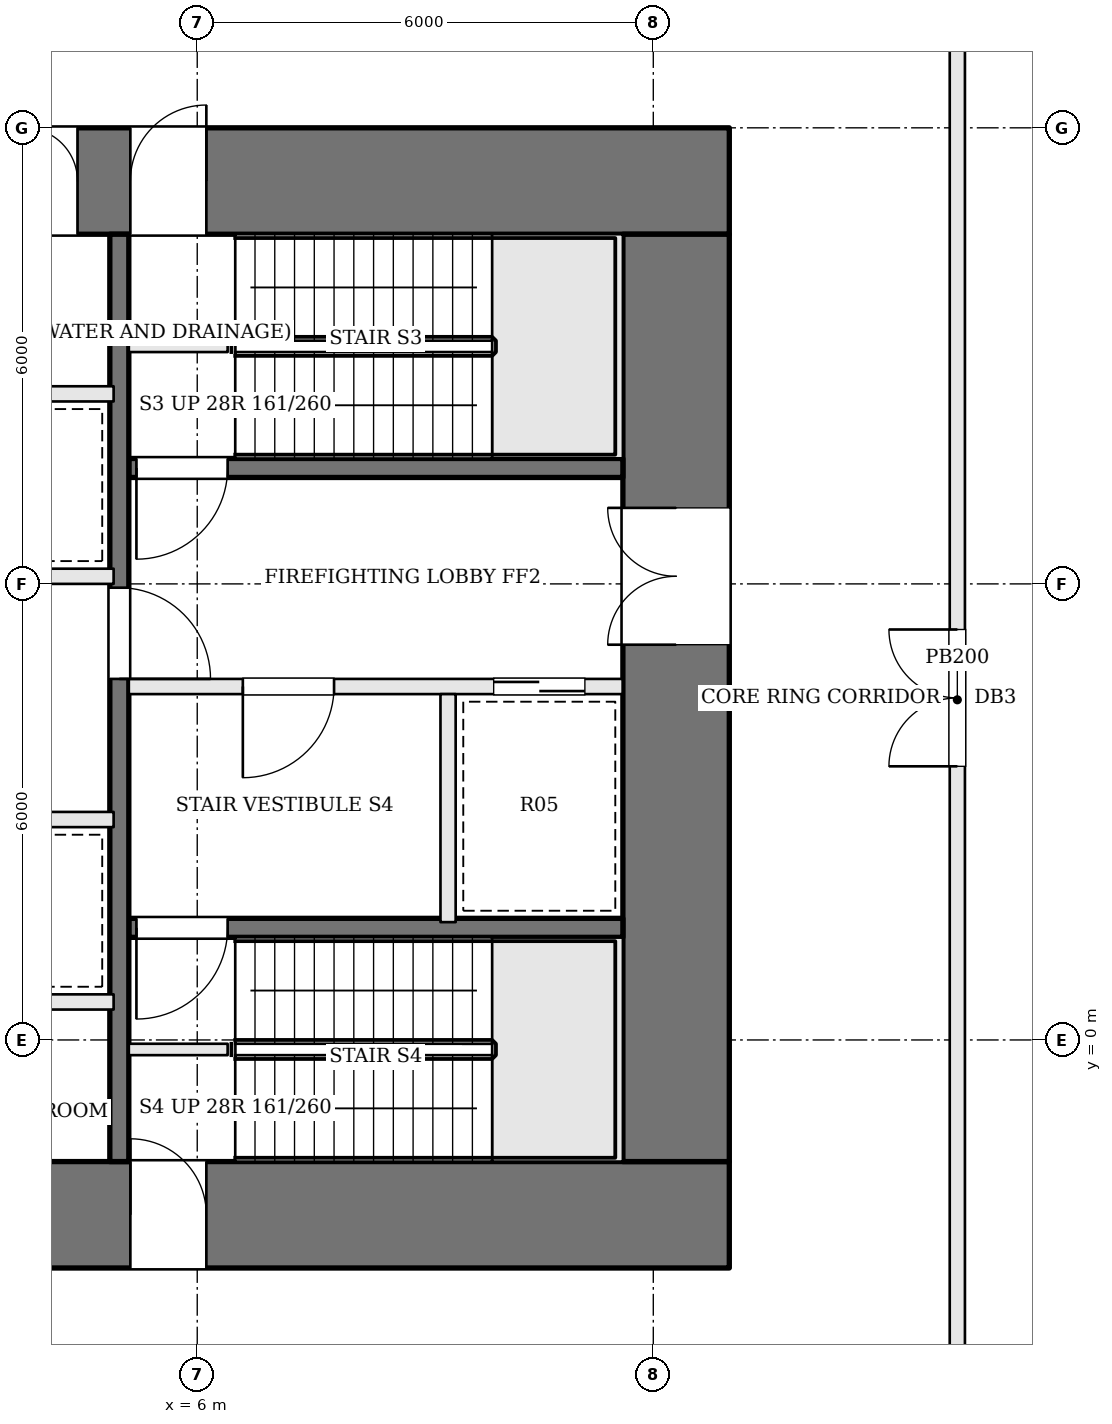
"""IFC4 building model, lengths in metres.
Left out: names, types, materials, properties, quantities, classifications, styles, units other than length and angle.
Written with IfcOpenShell. Run it as: python <this file> out.ifc"""

import sys

from ifc_helpers import new_model, si_unit, direction, frame, frame_2d, origin, place, context, subcontext, project, spatial, rectangle, extrude, element, fill, save


model = new_model("IFC4")
c1 = context("Model", 3, precision=1e-05, world=origin(), true_north=direction((0.0, 1.0)))
c2 = subcontext(c1, "Body", "Model", "MODEL_VIEW")
j1 = project(units=[si_unit("LENGTHUNIT", "METRE"), si_unit("PLANEANGLEUNIT", "RADIAN")], contexts=[c1])
p1 = place(None, origin())
s1 = spatial("IfcSite", under=j1, at=p1, CompositionType="ELEMENT")
p2 = place(p1, origin())
s2 = spatial("IfcBuilding", under=s1, at=p2, CompositionType="ELEMENT")
p3 = place(p2, frame((0.0, 0.0, 33.0)))
s3 = spatial("IfcBuildingStorey", under=s2, at=p3, CompositionType="ELEMENT", Elevation=33.0)
p4 = place(p3, frame((-13.0, 11.3, 0.0), z_axis=(0.0, 0.0, 1.0), x_axis=(1.0, 0.0, 0.0)))
e1 = element("IfcWall", 1, at=p4, inside=s3, PredefinedType="SHEAR", context=c2, shape_type="SweptSolid", body=[
    extrude(rectangle(XDim=26.0, YDim=1.4, at=frame_2d((13.0, 0.0))), origin(), (0.0, 0.0, 1.0), 4.5),
])
p5 = place(p4, frame((8.975, 0.0, 0.0)))
e2 = element("IfcOpeningElement", 2, at=p5, cuts=e1, PredefinedType="OPENING", context=c2, shape_type="SweptSolid", body=[
    extrude(rectangle(XDim=0.7, YDim=2.1, at=frame_2d((0.35, 1.05))), frame((0.0, 0.71, 0.0), z_axis=(0.0, -1.0, 0.0), x_axis=(1.0, 0.0, 0.0)), (0.0, 0.0, 1.0), 1.42),
])
p6 = place(p4, frame((11.575, 0.0, 0.0)))
e3 = element("IfcOpeningElement", 3, at=p6, cuts=e1, PredefinedType="OPENING", context=c2, shape_type="SweptSolid", body=[
    extrude(rectangle(XDim=1.2, YDim=2.1, at=frame_2d((0.6, 1.05))), frame((0.0, 0.71, 0.0), z_axis=(0.0, -1.0, 0.0), x_axis=(1.0, 0.0, 0.0)), (0.0, 0.0, 1.0), 1.42),
])
p7 = place(p4, frame((14.675, 0.0, 0.0)))
e4 = element("IfcOpeningElement", 4, at=p7, cuts=e1, PredefinedType="OPENING", context=c2, shape_type="SweptSolid", body=[
    extrude(rectangle(XDim=0.7, YDim=2.1, at=frame_2d((0.35, 1.05))), frame((0.0, 0.71, 0.0), z_axis=(0.0, -1.0, 0.0), x_axis=(1.0, 0.0, 0.0)), (0.0, 0.0, 1.0), 1.42),
])
p8 = place(p4, frame((16.725, 0.0, 0.0)))
e5 = element("IfcOpeningElement", 5, at=p8, cuts=e1, PredefinedType="OPENING", context=c2, shape_type="SweptSolid", body=[
    extrude(rectangle(XDim=0.7, YDim=2.1, at=frame_2d((0.35, 1.05))), frame((0.0, 0.71, 0.0), z_axis=(0.0, -1.0, 0.0), x_axis=(1.0, 0.0, 0.0)), (0.0, 0.0, 1.0), 1.42),
])
p9 = place(p4, frame((6.88, 0.0, 0.0)))
e6 = element("IfcOpeningElement", 6, at=p9, cuts=e1, PredefinedType="OPENING", context=c2, shape_type="SweptSolid", body=[
    extrude(rectangle(XDim=1.0, YDim=2.1, at=frame_2d((0.5, 1.05))), frame((0.0, 0.71, 0.0), z_axis=(0.0, -1.0, 0.0), x_axis=(1.0, 0.0, 0.0)), (0.0, 0.0, 1.0), 1.42),
])
p10 = place(p4, frame((18.12, 0.0, 0.0)))
e7 = element("IfcOpeningElement", 7, at=p10, cuts=e1, PredefinedType="OPENING", context=c2, shape_type="SweptSolid", body=[
    extrude(rectangle(XDim=1.0, YDim=2.1, at=frame_2d((0.5, 1.05))), frame((0.0, 0.71, 0.0), z_axis=(0.0, -1.0, 0.0), x_axis=(1.0, 0.0, 0.0)), (0.0, 0.0, 1.0), 1.42),
])
p11 = place(p3, frame((-13.0, -2.3, 0.0), z_axis=(0.0, 0.0, 1.0), x_axis=(1.0, 0.0, 0.0)))
e8 = element("IfcWall", 8, at=p11, inside=s3, PredefinedType="SHEAR", context=c2, shape_type="SweptSolid", body=[
    extrude(rectangle(XDim=26.0, YDim=1.4, at=frame_2d((13.0, 0.0))), origin(), (0.0, 0.0, 1.0), 4.5),
])
p12 = place(p11, frame((9.125, 0.0, 0.0)))
e9 = element("IfcOpeningElement", 9, at=p12, cuts=e8, PredefinedType="OPENING", context=c2, shape_type="SweptSolid", body=[
    extrude(rectangle(XDim=1.2, YDim=2.1, at=frame_2d((0.6, 1.05))), frame((0.0, 0.71, 0.0), z_axis=(0.0, -1.0, 0.0), x_axis=(1.0, 0.0, 0.0)), (0.0, 0.0, 1.0), 1.42),
])
p13 = place(p11, frame((12.375, 0.0, 0.0)))
e10 = element("IfcOpeningElement", 10, at=p13, cuts=e8, PredefinedType="OPENING", context=c2, shape_type="SweptSolid", body=[
    extrude(rectangle(XDim=1.2, YDim=2.1, at=frame_2d((0.6, 1.05))), frame((0.0, 0.71, 0.0), z_axis=(0.0, -1.0, 0.0), x_axis=(1.0, 0.0, 0.0)), (0.0, 0.0, 1.0), 1.42),
])
p14 = place(p11, frame((15.65, 0.0, 0.0)))
e11 = element("IfcOpeningElement", 11, at=p14, cuts=e8, PredefinedType="OPENING", context=c2, shape_type="SweptSolid", body=[
    extrude(rectangle(XDim=1.2, YDim=2.1, at=frame_2d((0.6, 1.05))), frame((0.0, 0.71, 0.0), z_axis=(0.0, -1.0, 0.0), x_axis=(1.0, 0.0, 0.0)), (0.0, 0.0, 1.0), 1.42),
])
p15 = place(p11, frame((6.88, 0.0, 0.0)))
e12 = element("IfcOpeningElement", 12, at=p15, cuts=e8, PredefinedType="OPENING", context=c2, shape_type="SweptSolid", body=[
    extrude(rectangle(XDim=1.0, YDim=2.1, at=frame_2d((0.5, 1.05))), frame((0.0, 0.71, 0.0), z_axis=(0.0, -1.0, 0.0), x_axis=(1.0, 0.0, 0.0)), (0.0, 0.0, 1.0), 1.42),
])
p16 = place(p11, frame((18.12, 0.0, 0.0)))
e13 = element("IfcOpeningElement", 13, at=p16, cuts=e8, PredefinedType="OPENING", context=c2, shape_type="SweptSolid", body=[
    extrude(rectangle(XDim=1.0, YDim=2.1, at=frame_2d((0.5, 1.05))), frame((0.0, 0.71, 0.0), z_axis=(0.0, -1.0, 0.0), x_axis=(1.0, 0.0, 0.0)), (0.0, 0.0, 1.0), 1.42),
])
p17 = place(p3, frame((12.3, -1.6, 0.0), z_axis=(0.0, 0.0, 1.0), x_axis=(0.0, 1.0, 0.0)))
e14 = element("IfcWall", 14, at=p17, inside=s3, PredefinedType="SHEAR", context=c2, shape_type="SweptSolid", body=[
    extrude(rectangle(XDim=12.2, YDim=1.4, at=frame_2d((6.1, 0.0))), origin(), (0.0, 0.0, 1.0), 4.5),
])
p18 = place(p17, frame((6.8, 0.0, 0.0)))
e15 = element("IfcOpeningElement", 15, at=p18, cuts=e14, PredefinedType="OPENING", context=c2, shape_type="SweptSolid", body=[
    extrude(rectangle(XDim=1.8, YDim=2.1, at=frame_2d((0.9, 1.05))), frame((0.0, 0.71, 0.0), z_axis=(0.0, -1.0, 0.0), x_axis=(1.0, 0.0, 0.0)), (0.0, 0.0, 1.0), 1.42),
])
for number, where, z_axis, x_axis in (
    (16, (6.4, 9.125, 0.0), (0.0, 0.0, 1.0), (-1.0, 0.0, 0.0)),
    (17, (6.4, -0.125, 0.0), (0.0, 0.0, 1.0), (-1.0, 0.0, 0.0)),
):
    element("IfcWall", number, at=place(p3, frame(where, z_axis=z_axis, x_axis=x_axis)), inside=s3, PredefinedType="SOLIDWALL", context=c2, shape_type="SweptSolid", body=[
        extrude(rectangle(XDim=1.3, YDim=0.15, at=frame_2d((0.65, 0.0))), origin(), (0.0, 0.0, 1.0), 4.3),
    ])
p19 = place(p3, frame((11.6, 7.525, 0.0), z_axis=(0.0, 0.0, 1.0), x_axis=(-1.0, 0.0, 0.0)))
e18 = element("IfcWall", 18, at=p19, inside=s3, PredefinedType="SOLIDWALL", context=c2, shape_type="SweptSolid", body=[
    extrude(rectangle(XDim=6.5, YDim=0.25, at=frame_2d((3.25, 0.0))), origin(), (0.0, 0.0, 1.0), 4.3),
])
p20 = place(p19, frame((5.2, 0.0, 0.0)))
e19 = element("IfcOpeningElement", 19, at=p20, cuts=e18, PredefinedType="OPENING", context=c2, shape_type="SweptSolid", body=[
    extrude(rectangle(XDim=1.2, YDim=2.1, at=frame_2d((0.6, 1.05))), frame((0.0, 0.135, 0.0), z_axis=(0.0, -1.0, 0.0), x_axis=(1.0, 0.0, 0.0)), (0.0, 0.0, 1.0), 0.27),
])
p21 = place(p3, frame((11.6, 4.65, 0.0), z_axis=(0.0, 0.0, 1.0), x_axis=(-1.0, 0.0, 0.0)))
e20 = element("IfcWall", 20, at=p21, inside=s3, PredefinedType="SOLIDWALL", context=c2, shape_type="SweptSolid", body=[
    extrude(rectangle(XDim=6.5, YDim=0.2, at=frame_2d((3.25, 0.0))), origin(), (0.0, 0.0, 1.0), 4.3),
])
p22 = place(p21, frame((3.8, 0.0, 0.0)))
e21 = element("IfcOpeningElement", 21, at=p22, cuts=e20, PredefinedType="OPENING", context=c2, shape_type="SweptSolid", body=[
    extrude(rectangle(XDim=1.2, YDim=2.1, at=frame_2d((0.6, 1.05))), frame((0.0, 0.11, 0.0), z_axis=(0.0, -1.0, 0.0), x_axis=(1.0, 0.0, 0.0)), (0.0, 0.0, 1.0), 0.22),
])
p23 = place(p21, frame((0.5, 0.0, 0.0)))
e22 = element("IfcOpeningElement", 22, at=p23, cuts=e20, PredefinedType="OPENING", context=c2, shape_type="SweptSolid", body=[
    extrude(rectangle(XDim=1.2, YDim=2.1, at=frame_2d((0.6, 1.05))), frame((0.0, 0.11, 0.0), z_axis=(0.0, -1.0, 0.0), x_axis=(1.0, 0.0, 0.0)), (0.0, 0.0, 1.0), 0.22),
])
p24 = place(p3, frame((11.6, 1.475, 0.0), z_axis=(0.0, 0.0, 1.0), x_axis=(-1.0, 0.0, 0.0)))
e23 = element("IfcWall", 23, at=p24, inside=s3, PredefinedType="SOLIDWALL", context=c2, shape_type="SweptSolid", body=[
    extrude(rectangle(XDim=6.5, YDim=0.25, at=frame_2d((3.25, 0.0))), origin(), (0.0, 0.0, 1.0), 4.3),
])
p25 = place(p24, frame((5.2, 0.0, 0.0)))
e24 = element("IfcOpeningElement", 24, at=p25, cuts=e23, PredefinedType="OPENING", context=c2, shape_type="SweptSolid", body=[
    extrude(rectangle(XDim=1.2, YDim=2.1, at=frame_2d((0.6, 1.05))), frame((0.0, 0.135, 0.0), z_axis=(0.0, -1.0, 0.0), x_axis=(1.0, 0.0, 0.0)), (0.0, 0.0, 1.0), 0.27),
])
p26 = place(p3, frame((9.3, 4.55, 0.0), z_axis=(0.0, 0.0, 1.0), x_axis=(0.0, -1.0, 0.0)))
e25 = element("IfcWall", 25, at=p26, inside=s3, PredefinedType="SOLIDWALL", context=c2, shape_type="SweptSolid", body=[
    extrude(rectangle(XDim=3.0, YDim=0.2, at=frame_2d((1.5, 0.0))), origin(), (0.0, 0.0, 1.0), 4.3),
])
p27 = place(p3, frame((4.975, 10.6, 0.0), z_axis=(0.0, 0.0, 1.0), x_axis=(0.0, -1.0, 0.0)))
e26 = element("IfcWall", 26, at=p27, inside=s3, PredefinedType="SOLIDWALL", context=c2, shape_type="SweptSolid", body=[
    extrude(rectangle(XDim=12.2, YDim=0.25, at=frame_2d((6.1, 0.0))), origin(), (0.0, 0.0, 1.0), 4.3),
])
p28 = place(p27, frame((4.65, 0.0, 0.0)))
e27 = element("IfcOpeningElement", 27, at=p28, cuts=e26, PredefinedType="OPENING", context=c2, shape_type="SweptSolid", body=[
    extrude(rectangle(XDim=1.2, YDim=2.1, at=frame_2d((0.6, 1.05))), frame((0.0, 0.135, 0.0), z_axis=(0.0, -1.0, 0.0), x_axis=(1.0, 0.0, 0.0)), (0.0, 0.0, 1.0), 0.27),
])
for number, where, z_axis, x_axis in (
    (28, (-4.9, 0.5, 0.0), (0.0, 0.0, 1.0), (1.0, 0.0, 0.0)),
    (29, (-4.9, 2.9, 0.0), (0.0, 0.0, 1.0), (1.0, 0.0, 0.0)),
    (30, (-4.9, 6.1, 0.0), (0.0, 0.0, 1.0), (1.0, 0.0, 0.0)),
    (31, (-4.9, 8.5, 0.0), (0.0, 0.0, 1.0), (1.0, 0.0, 0.0)),
):
    element("IfcWall", number, at=place(p3, frame(where, z_axis=z_axis, x_axis=x_axis)), inside=s3, PredefinedType="SOLIDWALL", context=c2, shape_type="SweptSolid", body=[
        extrude(rectangle(XDim=9.8, YDim=0.2, at=frame_2d((4.9, 0.0))), origin(), (0.0, 0.0, 1.0), 4.3),
    ])
p29 = place(p3, frame((16.0, -5.9, 0.0), z_axis=(0.0, 0.0, 1.0), x_axis=(0.0, 1.0, 0.0)))
e32 = element("IfcWall", 32, at=p29, inside=s3, PredefinedType="PARTITIONING", context=c2, shape_type="SweptSolid", body=[
    extrude(rectangle(XDim=20.75, YDim=0.2, at=frame_2d((10.375, 0.0))), origin(), (0.0, 0.0, 1.0), 4.3),
])
p30 = place(p29, frame((9.5, 0.0, 0.0)))
e33 = element("IfcOpeningElement", 33, at=p30, cuts=e32, PredefinedType="OPENING", context=c2, shape_type="SweptSolid", body=[
    extrude(rectangle(XDim=1.8, YDim=2.1, at=frame_2d((0.9, 1.05))), frame((0.0, 0.11, 0.0), z_axis=(0.0, -1.0, 0.0), x_axis=(1.0, 0.0, 0.0)), (0.0, 0.0, 1.0), 0.22),
])
p31 = place(p3, frame((14.392, 16.035, 0.0), z_axis=(0.0, 0.0, 1.0), x_axis=(0.863774384703, -0.503878767493, 0.0)))
e34 = element("IfcWall", 34, at=p31, inside=s3, PredefinedType="SOLIDWALL", context=c2, shape_type="SweptSolid", body=[
    extrude(rectangle(XDim=5.882, YDim=0.3, at=frame_2d((2.941, 0.0))), origin(), (0.0, 0.0, 1.0), 4.3),
])
p32 = place(p18, origin())
e35 = element("IfcDoor", 35, at=p32, inside=s3, OperationType="DOUBLE_DOOR_SINGLE_SWING", PredefinedType="DOOR", context=c2, shape_type="SweptSolid", body=[
    extrude(rectangle(XDim=1.8, YDim=2.1, at=frame_2d((0.9, 1.05))), frame((0.0, 0.025, 0.0), z_axis=(0.0, -1.0, 0.0), x_axis=(1.0, 0.0, 0.0)), (0.0, 0.0, 1.0), 0.05),
])
fill(e15, e35)
p33 = place(p28, origin())
e36 = element("IfcDoor", 36, at=p33, inside=s3, OperationType="SINGLE_SWING_RIGHT", PredefinedType="DOOR", context=c2, shape_type="SweptSolid", body=[
    extrude(rectangle(XDim=1.2, YDim=2.1, at=frame_2d((0.6, 1.05))), frame((0.0, 0.025, 0.0), z_axis=(0.0, -1.0, 0.0), x_axis=(1.0, 0.0, 0.0)), (0.0, 0.0, 1.0), 0.05),
])
fill(e27, e36)
p34 = place(p22, origin())
e37 = element("IfcDoor", 37, at=p34, inside=s3, OperationType="SINGLE_SWING_RIGHT", PredefinedType="DOOR", context=c2, shape_type="SweptSolid", body=[
    extrude(rectangle(XDim=1.2, YDim=2.1, at=frame_2d((0.6, 1.05))), frame((0.0, 0.025, 0.0), z_axis=(0.0, -1.0, 0.0), x_axis=(1.0, 0.0, 0.0)), (0.0, 0.0, 1.0), 0.05),
])
fill(e21, e37)
p35 = place(p20, origin())
e38 = element("IfcDoor", 38, at=p35, inside=s3, OperationType="SINGLE_SWING_RIGHT", PredefinedType="DOOR", context=c2, shape_type="SweptSolid", body=[
    extrude(rectangle(XDim=1.2, YDim=2.1, at=frame_2d((0.6, 1.05))), frame((0.0, 0.025, 0.0), z_axis=(0.0, -1.0, 0.0), x_axis=(1.0, 0.0, 0.0)), (0.0, 0.0, 1.0), 0.05),
])
fill(e19, e38)
p36 = place(p25, origin())
e39 = element("IfcDoor", 39, at=p36, inside=s3, OperationType="SINGLE_SWING_RIGHT", PredefinedType="DOOR", context=c2, shape_type="SweptSolid", body=[
    extrude(rectangle(XDim=1.2, YDim=2.1, at=frame_2d((0.6, 1.05))), frame((0.0, 0.025, 0.0), z_axis=(0.0, -1.0, 0.0), x_axis=(1.0, 0.0, 0.0)), (0.0, 0.0, 1.0), 0.05),
])
fill(e24, e39)
p37 = place(p23, origin())
e40 = element("IfcDoor", 40, at=p37, inside=s3, OperationType="SLIDING_TO_RIGHT", PredefinedType="DOOR", context=c2, shape_type="SweptSolid", body=[
    extrude(rectangle(XDim=1.2, YDim=2.1, at=frame_2d((0.6, 1.05))), frame((0.0, 0.025, 0.0), z_axis=(0.0, -1.0, 0.0), x_axis=(1.0, 0.0, 0.0)), (0.0, 0.0, 1.0), 0.05),
])
fill(e22, e40)
p38 = place(p8, origin())
e41 = element("IfcDoor", 41, at=p38, inside=s3, OperationType="SINGLE_SWING_LEFT", PredefinedType="DOOR", context=c2, shape_type="SweptSolid", body=[
    extrude(rectangle(XDim=0.7, YDim=2.1, at=frame_2d((0.35, 1.05))), frame((0.0, 0.025, 0.0), z_axis=(0.0, -1.0, 0.0), x_axis=(1.0, 0.0, 0.0)), (0.0, 0.0, 1.0), 0.05),
])
fill(e5, e41)
p39 = place(p10, origin())
e42 = element("IfcDoor", 42, at=p39, inside=s3, OperationType="SINGLE_SWING_RIGHT", PredefinedType="DOOR", context=c2, shape_type="SweptSolid", body=[
    extrude(rectangle(XDim=1.0, YDim=2.1, at=frame_2d((0.5, 1.05))), frame((0.0, 0.025, 0.0), z_axis=(0.0, -1.0, 0.0), x_axis=(1.0, 0.0, 0.0)), (0.0, 0.0, 1.0), 0.05),
])
fill(e7, e42)
p40 = place(p16, origin())
e43 = element("IfcDoor", 43, at=p40, inside=s3, OperationType="SINGLE_SWING_LEFT", PredefinedType="DOOR", context=c2, shape_type="SweptSolid", body=[
    extrude(rectangle(XDim=1.0, YDim=2.1, at=frame_2d((0.5, 1.05))), frame((0.0, 0.025, 0.0), z_axis=(0.0, -1.0, 0.0), x_axis=(1.0, 0.0, 0.0)), (0.0, 0.0, 1.0), 0.05),
])
fill(e13, e43)
p41 = place(p30, origin())
e44 = element("IfcDoor", 44, at=p41, inside=s3, OperationType="DOUBLE_DOOR_SINGLE_SWING", PredefinedType="DOOR", context=c2, shape_type="SweptSolid", body=[
    extrude(rectangle(XDim=1.8, YDim=2.1, at=frame_2d((0.9, 1.05))), frame((0.0, 0.025, 0.0), z_axis=(0.0, -1.0, 0.0), x_axis=(1.0, 0.0, 0.0)), (0.0, 0.0, 1.0), 0.05),
])
fill(e33, e44)
save(model, sys.argv[1])
